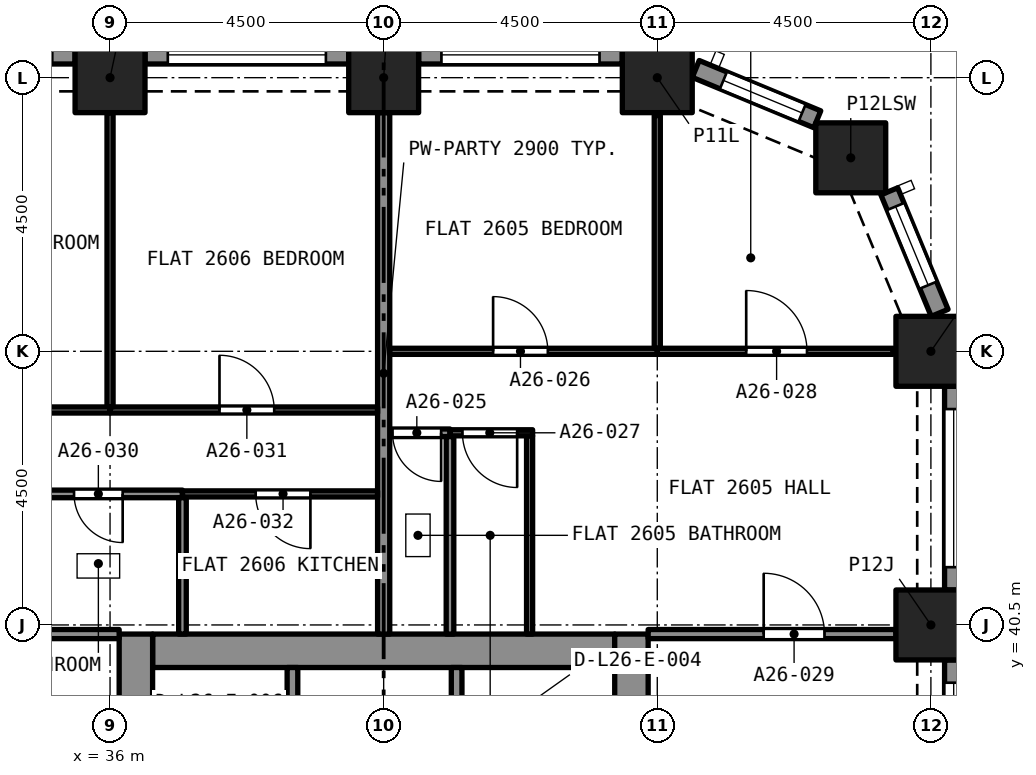
"""IFC4 building model, lengths in metres.
Left out: names, types, materials, properties, quantities, classifications, styles, units other than length and angle.
Written with IfcOpenShell. Run it as: python <this file> out.ifc"""

import sys

from ifc_helpers import new_model, si_unit, direction, frame, frame_2d, origin, origin_2d, place, context, subcontext, project, spatial, rectangle, extrude, element, fill, save


model = new_model("IFC4")
c1 = context("Model", 3, precision=1e-05, world=origin(), true_north=direction((0.0, 1.0)))
c2 = subcontext(c1, "Body", "Model", "MODEL_VIEW")
j1 = project(units=[si_unit("LENGTHUNIT", "METRE"), si_unit("PLANEANGLEUNIT", "RADIAN")], contexts=[c1])
p1 = place(None, origin())
s1 = spatial("IfcSite", under=j1, at=p1, CompositionType="ELEMENT")
p2 = place(p1, origin())
s2 = spatial("IfcBuilding", under=s1, at=p2, CompositionType="ELEMENT")
p3 = place(p2, frame((0.0, 0.0, 96.0)))
s3 = spatial("IfcBuildingStorey", under=s2, at=p3, CompositionType="ELEMENT", Elevation=96.0)
for number, where, z_axis, x_axis in (
    (1, (49.5, 40.5, 0.0), (0.0, 0.0, 1.0), (1.0, 0.0, 0.0)),
    (2, (49.5, 45.0, 0.0), (0.0, 0.0, 1.0), (1.0, 0.0, 0.0)),
    (3, (48.182, 48.182, 0.0), (0.0, 0.0, 1.0), (1.0, 0.0, 0.0)),
    (4, (36.0, 49.5, 0.0), (0.0, 0.0, 1.0), (1.0, 0.0, 0.0)),
    (5, (40.5, 49.5, 0.0), (0.0, 0.0, 1.0), (1.0, 0.0, 0.0)),
    (6, (45.0, 49.5, 0.0), (0.0, 0.0, 1.0), (1.0, 0.0, 0.0)),
):
    element("IfcColumn", number, at=place(p3, frame(where, z_axis=z_axis, x_axis=x_axis)), inside=s3, PredefinedType="COLUMN", context=c2, shape_type="SweptSolid", body=[
        extrude(rectangle(XDim=1.15, YDim=1.15, at=origin_2d()), origin(), (0.0, 0.0, 1.0), 3.2),
    ])
p4 = place(p3, frame((36.7, 40.075, 0.0), z_axis=(0.0, 0.0, 1.0), x_axis=(1.0, 0.0, 0.0)))
e7 = element("IfcWall", 7, at=p4, inside=s3, PredefinedType="SOLIDWALL", context=c2, shape_type="SweptSolid", body=[
    extrude(rectangle(XDim=7.6, YDim=0.55, at=frame_2d((3.8, 0.0))), origin(), (0.0, 0.0, 1.0), 3.2),
])
p5 = place(p3, frame((36.425, 27.15, 0.0), z_axis=(0.0, 0.0, 1.0), x_axis=(0.0, 1.0, 0.0)))
e8 = element("IfcWall", 8, at=p5, inside=s3, PredefinedType="SOLIDWALL", context=c2, shape_type="SweptSolid", body=[
    extrude(rectangle(XDim=13.2, YDim=0.55, at=frame_2d((6.6, 0.0))), origin(), (0.0, 0.0, 1.0), 3.2),
])
p6 = place(p5, frame((8.8, 0.0, 0.0)))
e9 = element("IfcOpeningElement", 9, at=p6, cuts=e8, PredefinedType="OPENING", context=c2, shape_type="SweptSolid", body=[
    extrude(rectangle(XDim=1.2, YDim=2.1, at=frame_2d((0.6, 1.05))), frame((0.0, 0.285, 0.0), z_axis=(0.0, -1.0, 0.0), x_axis=(1.0, 0.0, 0.0)), (0.0, 0.0, 1.0), 0.57),
])
p7 = place(p3, frame((44.575, 27.15, 0.0), z_axis=(0.0, 0.0, 1.0), x_axis=(0.0, 1.0, 0.0)))
e10 = element("IfcWall", 10, at=p7, inside=s3, PredefinedType="SOLIDWALL", context=c2, shape_type="SweptSolid", body=[
    extrude(rectangle(XDim=13.2, YDim=0.55, at=frame_2d((6.6, 0.0))), origin(), (0.0, 0.0, 1.0), 3.2),
])
p8 = place(p7, frame((8.8, 0.0, 0.0)))
e11 = element("IfcOpeningElement", 11, at=p8, cuts=e10, PredefinedType="OPENING", context=c2, shape_type="SweptSolid", body=[
    extrude(rectangle(XDim=1.2, YDim=2.1, at=frame_2d((0.6, 1.05))), frame((0.0, 0.285, 0.0), z_axis=(0.0, -1.0, 0.0), x_axis=(1.0, 0.0, 0.0)), (0.0, 0.0, 1.0), 0.57),
])
p9 = place(p3, frame((49.875, 39.925, 0.0), z_axis=(0.0, 0.0, 1.0), x_axis=(0.0, -1.0, 0.0)))
e12 = element("IfcWall", 12, at=p9, inside=s3, PredefinedType="SOLIDWALL", context=c2, shape_type="SweptSolid", body=[
    extrude(rectangle(XDim=3.35, YDim=0.3, at=frame_2d((1.675, 0.0))), origin(), (0.0, 0.0, 1.0), 3.2),
])
p10 = place(p9, frame((0.375, 0.0, 0.45)))
e13 = element("IfcOpeningElement", 13, at=p10, cuts=e12, PredefinedType="OPENING", context=c2, shape_type="SweptSolid", body=[
    extrude(rectangle(XDim=2.6, YDim=1.95, at=frame_2d((1.3, 0.975))), frame((0.0, 0.16, 0.0), z_axis=(0.0, -1.0, 0.0), x_axis=(1.0, 0.0, 0.0)), (0.0, 0.0, 1.0), 0.32),
])
p11 = place(p3, frame((49.875, 44.425, 0.0), z_axis=(0.0, 0.0, 1.0), x_axis=(0.0, -1.0, 0.0)))
e14 = element("IfcWall", 14, at=p11, inside=s3, PredefinedType="SOLIDWALL", context=c2, shape_type="SweptSolid", body=[
    extrude(rectangle(XDim=3.35, YDim=0.3, at=frame_2d((1.675, 0.0))), origin(), (0.0, 0.0, 1.0), 3.2),
])
p12 = place(p11, frame((0.375, 0.0, 0.45)))
e15 = element("IfcOpeningElement", 15, at=p12, cuts=e14, PredefinedType="OPENING", context=c2, shape_type="SweptSolid", body=[
    extrude(rectangle(XDim=2.6, YDim=1.95, at=frame_2d((1.3, 0.975))), frame((0.0, 0.16, 0.0), z_axis=(0.0, -1.0, 0.0), x_axis=(1.0, 0.0, 0.0)), (0.0, 0.0, 1.0), 0.32),
])
p13 = place(p3, frame((48.816, 47.631, 0.0), z_axis=(0.0, 0.0, 1.0), x_axis=(0.382723818695, -0.923862802911, 0.0)))
e16 = element("IfcWall", 16, at=p13, inside=s3, PredefinedType="SOLIDWALL", context=c2, shape_type="SweptSolid", body=[
    extrude(rectangle(XDim=2.164, YDim=0.3, at=frame_2d((1.082, 0.0))), origin(), (0.0, 0.0, 1.0), 3.2),
])
p14 = place(p13, frame((0.271, 0.0, 0.45)))
e17 = element("IfcOpeningElement", 17, at=p14, cuts=e16, PredefinedType="OPENING", context=c2, shape_type="SweptSolid", body=[
    extrude(rectangle(XDim=1.4, YDim=1.95, at=frame_2d((0.7, 0.975))), frame((0.0, 0.16, 0.0), z_axis=(0.0, -1.0, 0.0), x_axis=(1.0, 0.0, 0.0)), (0.0, 0.0, 1.0), 0.32),
])
p15 = place(p3, frame((45.632, 49.644, 0.0), z_axis=(0.0, 0.0, 1.0), x_axis=(0.923862802911, -0.382723818695, 0.0)))
e18 = element("IfcWall", 18, at=p15, inside=s3, PredefinedType="SOLIDWALL", context=c2, shape_type="SweptSolid", body=[
    extrude(rectangle(XDim=2.164, YDim=0.3, at=frame_2d((1.082, 0.0))), origin(), (0.0, 0.0, 1.0), 3.2),
])
p16 = place(p15, frame((0.493, 0.0, 0.45)))
e19 = element("IfcOpeningElement", 19, at=p16, cuts=e18, PredefinedType="OPENING", context=c2, shape_type="SweptSolid", body=[
    extrude(rectangle(XDim=1.4, YDim=1.95, at=frame_2d((0.7, 0.975))), frame((0.0, 0.16, 0.0), z_axis=(0.0, -1.0, 0.0), x_axis=(1.0, 0.0, 0.0)), (0.0, 0.0, 1.0), 0.32),
])
p17 = place(p3, frame((41.075, 49.875, 0.0), z_axis=(0.0, 0.0, 1.0), x_axis=(1.0, 0.0, 0.0)))
e20 = element("IfcWall", 20, at=p17, inside=s3, PredefinedType="SOLIDWALL", context=c2, shape_type="SweptSolid", body=[
    extrude(rectangle(XDim=3.35, YDim=0.3, at=frame_2d((1.675, 0.0))), origin(), (0.0, 0.0, 1.0), 3.2),
])
p18 = place(p17, frame((0.375, 0.0, 0.45)))
e21 = element("IfcOpeningElement", 21, at=p18, cuts=e20, PredefinedType="OPENING", context=c2, shape_type="SweptSolid", body=[
    extrude(rectangle(XDim=2.6, YDim=1.95, at=frame_2d((1.3, 0.975))), frame((0.0, 0.16, 0.0), z_axis=(0.0, -1.0, 0.0), x_axis=(1.0, 0.0, 0.0)), (0.0, 0.0, 1.0), 0.32),
])
p19 = place(p3, frame((36.575, 49.875, 0.0), z_axis=(0.0, 0.0, 1.0), x_axis=(1.0, 0.0, 0.0)))
e22 = element("IfcWall", 22, at=p19, inside=s3, PredefinedType="SOLIDWALL", context=c2, shape_type="SweptSolid", body=[
    extrude(rectangle(XDim=3.35, YDim=0.3, at=frame_2d((1.675, 0.0))), origin(), (0.0, 0.0, 1.0), 3.2),
])
p20 = place(p19, frame((0.375, 0.0, 0.45)))
e23 = element("IfcOpeningElement", 23, at=p20, cuts=e22, PredefinedType="OPENING", context=c2, shape_type="SweptSolid", body=[
    extrude(rectangle(XDim=2.6, YDim=1.95, at=frame_2d((1.3, 0.975))), frame((0.0, 0.16, 0.0), z_axis=(0.0, -1.0, 0.0), x_axis=(1.0, 0.0, 0.0)), (0.0, 0.0, 1.0), 0.32),
])
p21 = place(p3, frame((32.075, 49.875, 0.0), z_axis=(0.0, 0.0, 1.0), x_axis=(1.0, 0.0, 0.0)))
e24 = element("IfcWall", 24, at=p21, inside=s3, PredefinedType="SOLIDWALL", context=c2, shape_type="SweptSolid", body=[
    extrude(rectangle(XDim=3.35, YDim=0.3, at=frame_2d((1.675, 0.0))), origin(), (0.0, 0.0, 1.0), 3.2),
])
p22 = place(p21, frame((0.375, 0.0, 0.45)))
e25 = element("IfcOpeningElement", 25, at=p22, cuts=e24, PredefinedType="OPENING", context=c2, shape_type="SweptSolid", body=[
    extrude(rectangle(XDim=2.6, YDim=1.95, at=frame_2d((1.3, 0.975))), frame((0.0, 0.16, 0.0), z_axis=(0.0, -1.0, 0.0), x_axis=(1.0, 0.0, 0.0)), (0.0, 0.0, 1.0), 0.32),
])
p23 = place(p3, frame((41.591, 43.66, 0.0), z_axis=(0.0, 0.0, 1.0), x_axis=(-1.0, 0.0, 0.0)))
e26 = element("IfcWall", 26, at=p23, inside=s3, PredefinedType="PARTITIONING", context=c2, shape_type="SweptSolid", body=[
    extrude(rectangle(XDim=0.991, YDim=0.125, at=frame_2d((0.495, 0.0))), origin(), (0.0, 0.0, 1.0), 2.9),
])
p24 = place(p23, frame((0.146, 0.0, 0.0)))
e27 = element("IfcOpeningElement", 27, at=p24, cuts=e26, PredefinedType="OPENING", context=c2, shape_type="SweptSolid", body=[
    extrude(rectangle(XDim=0.8, YDim=2.1, at=frame_2d((0.4, 1.05))), frame((0.0, 0.073, 0.0), z_axis=(0.0, -1.0, 0.0), x_axis=(1.0, 0.0, 0.0)), (0.0, 0.0, 1.0), 0.145),
])
p25 = place(p3, frame((41.591, 40.35, 0.0), z_axis=(0.0, 0.0, 1.0), x_axis=(0.0, 1.0, 0.0)))
e28 = element("IfcWall", 28, at=p25, inside=s3, PredefinedType="PARTITIONING", context=c2, shape_type="SweptSolid", body=[
    extrude(rectangle(XDim=3.247, YDim=0.125, at=frame_2d((1.624, 0.0))), origin(), (0.0, 0.0, 1.0), 2.9),
])
p26 = place(p3, frame((40.5, 40.35, 0.0), z_axis=(0.0, 0.0, 1.0), x_axis=(0.0, 1.0, 0.0)))
e29 = element("IfcWall", 29, at=p26, inside=s3, PredefinedType="PARTITIONING", context=c2, shape_type="SweptSolid", body=[
    extrude(rectangle(XDim=8.575, YDim=0.2, at=frame_2d((4.288, 0.0))), origin(), (0.0, 0.0, 1.0), 2.9),
])
p27 = place(p3, frame((40.6, 45.0, 0.0), z_axis=(0.0, 0.0, 1.0), x_axis=(1.0, 0.0, 0.0)))
e30 = element("IfcWall", 30, at=p27, inside=s3, PredefinedType="PARTITIONING", context=c2, shape_type="SweptSolid", body=[
    extrude(rectangle(XDim=4.4, YDim=0.1, at=frame_2d((2.2, 0.0))), origin(), (0.0, 0.0, 1.0), 2.9),
])
p28 = place(p27, frame((1.7, 0.0, 0.0)))
e31 = element("IfcOpeningElement", 31, at=p28, cuts=e30, PredefinedType="OPENING", context=c2, shape_type="SweptSolid", body=[
    extrude(rectangle(XDim=0.9, YDim=2.1, at=frame_2d((0.45, 1.05))), frame((0.0, 0.06, 0.0), z_axis=(0.0, -1.0, 0.0), x_axis=(1.0, 0.0, 0.0)), (0.0, 0.0, 1.0), 0.12),
])
p29 = place(p3, frame((45.0, 45.05, 0.0), z_axis=(0.0, 0.0, 1.0), x_axis=(0.0, 1.0, 0.0)))
e32 = element("IfcWall", 32, at=p29, inside=s3, PredefinedType="PARTITIONING", context=c2, shape_type="SweptSolid", body=[
    extrude(rectangle(XDim=3.828, YDim=0.1, at=frame_2d((1.914, 0.0))), origin(), (0.0, 0.0, 1.0), 2.9),
])
p30 = place(p3, frame((42.9, 40.35, 0.0), z_axis=(0.0, 0.0, 1.0), x_axis=(0.0, 1.0, 0.0)))
e33 = element("IfcWall", 33, at=p30, inside=s3, PredefinedType="PARTITIONING", context=c2, shape_type="SweptSolid", body=[
    extrude(rectangle(XDim=3.26, YDim=0.1, at=frame_2d((1.63, 0.0))), origin(), (0.0, 0.0, 1.0), 2.9),
])
p31 = place(p3, frame((42.95, 43.66, 0.0), z_axis=(0.0, 0.0, 1.0), x_axis=(-1.0, 0.0, 0.0)))
e34 = element("IfcWall", 34, at=p31, inside=s3, PredefinedType="PARTITIONING", context=c2, shape_type="SweptSolid", body=[
    extrude(rectangle(XDim=1.359, YDim=0.1, at=frame_2d((0.68, 0.0))), origin(), (0.0, 0.0, 1.0), 2.9),
])
p32 = place(p31, frame((0.254, 0.0, 0.0)))
e35 = element("IfcOpeningElement", 35, at=p32, cuts=e34, PredefinedType="OPENING", context=c2, shape_type="SweptSolid", body=[
    extrude(rectangle(XDim=0.9, YDim=2.1, at=frame_2d((0.45, 1.05))), frame((0.0, 0.06, 0.0), z_axis=(0.0, -1.0, 0.0), x_axis=(1.0, 0.0, 0.0)), (0.0, 0.0, 1.0), 0.12),
])
p33 = place(p3, frame((45.0, 45.0, 0.0), z_axis=(0.0, 0.0, 1.0), x_axis=(1.0, 0.0, 0.0)))
e36 = element("IfcWall", 36, at=p33, inside=s3, PredefinedType="PARTITIONING", context=c2, shape_type="SweptSolid", body=[
    extrude(rectangle(XDim=3.878, YDim=0.1, at=frame_2d((1.939, 0.0))), origin(), (0.0, 0.0, 1.0), 2.9),
])
p34 = place(p33, frame((1.462, 0.0, 0.0)))
e37 = element("IfcOpeningElement", 37, at=p34, cuts=e36, PredefinedType="OPENING", context=c2, shape_type="SweptSolid", body=[
    extrude(rectangle(XDim=1.0, YDim=2.1, at=frame_2d((0.5, 1.05))), frame((0.0, 0.06, 0.0), z_axis=(0.0, -1.0, 0.0), x_axis=(1.0, 0.0, 0.0)), (0.0, 0.0, 1.0), 0.12),
])
p35 = place(p3, frame((44.85, 40.35, 0.0), z_axis=(0.0, 0.0, 1.0), x_axis=(1.0, 0.0, 0.0)))
e38 = element("IfcWall", 38, at=p35, inside=s3, PredefinedType="PARTITIONING", context=c2, shape_type="SweptSolid", body=[
    extrude(rectangle(XDim=4.075, YDim=0.15, at=frame_2d((2.038, 0.0))), origin(), (0.0, 0.0, 1.0), 2.9),
])
p36 = place(p35, frame((1.9, 0.0, 0.0)))
e39 = element("IfcOpeningElement", 39, at=p36, cuts=e38, PredefinedType="OPENING", context=c2, shape_type="SweptSolid", body=[
    extrude(rectangle(XDim=1.0, YDim=2.1, at=frame_2d((0.5, 1.05))), frame((0.0, 0.085, 0.0), z_axis=(0.0, -1.0, 0.0), x_axis=(1.0, 0.0, 0.0)), (0.0, 0.0, 1.0), 0.17),
])
p37 = place(p3, frame((37.19, 42.655, 0.0), z_axis=(0.0, 0.0, 1.0), x_axis=(-1.0, 0.0, 0.0)))
e40 = element("IfcWall", 40, at=p37, inside=s3, PredefinedType="PARTITIONING", context=c2, shape_type="SweptSolid", body=[
    extrude(rectangle(XDim=2.828, YDim=0.125, at=frame_2d((1.414, 0.0))), origin(), (0.0, 0.0, 1.0), 2.9),
])
p38 = place(p37, frame((0.983, 0.0, 0.0)))
e41 = element("IfcOpeningElement", 41, at=p38, cuts=e40, PredefinedType="OPENING", context=c2, shape_type="SweptSolid", body=[
    extrude(rectangle(XDim=0.8, YDim=2.1, at=frame_2d((0.4, 1.05))), frame((0.0, 0.073, 0.0), z_axis=(0.0, -1.0, 0.0), x_axis=(1.0, 0.0, 0.0)), (0.0, 0.0, 1.0), 0.145),
])
p39 = place(p3, frame((37.191, 40.35, 0.0), z_axis=(0.0, 0.0, 1.0), x_axis=(0.0, 1.0, 0.0)))
e42 = element("IfcWall", 42, at=p39, inside=s3, PredefinedType="PARTITIONING", context=c2, shape_type="SweptSolid", body=[
    extrude(rectangle(XDim=2.242, YDim=0.125, at=frame_2d((1.121, 0.0))), origin(), (0.0, 0.0, 1.0), 2.9),
])
p40 = place(p3, frame((34.425, 40.35, 0.0), z_axis=(0.0, 0.0, 1.0), x_axis=(1.0, 0.0, 0.0)))
e43 = element("IfcWall", 43, at=p40, inside=s3, PredefinedType="PARTITIONING", context=c2, shape_type="SweptSolid", body=[
    extrude(rectangle(XDim=1.725, YDim=0.15, at=frame_2d((0.862, 0.0))), origin(), (0.0, 0.0, 1.0), 2.9),
])
p41 = place(p3, frame((36.0, 44.035, 0.0), z_axis=(0.0, 0.0, 1.0), x_axis=(1.0, 0.0, 0.0)))
e44 = element("IfcWall", 44, at=p41, inside=s3, PredefinedType="PARTITIONING", context=c2, shape_type="SweptSolid", body=[
    extrude(rectangle(XDim=4.4, YDim=0.1, at=frame_2d((2.2, 0.0))), origin(), (0.0, 0.0, 1.0), 2.9),
])
p42 = place(p41, frame((1.8, 0.0, 0.0)))
e45 = element("IfcOpeningElement", 45, at=p42, cuts=e44, PredefinedType="OPENING", context=c2, shape_type="SweptSolid", body=[
    extrude(rectangle(XDim=0.9, YDim=2.1, at=frame_2d((0.45, 1.05))), frame((0.0, 0.06, 0.0), z_axis=(0.0, -1.0, 0.0), x_axis=(1.0, 0.0, 0.0)), (0.0, 0.0, 1.0), 0.12),
])
p43 = place(p3, frame((36.0, 44.085, 0.0), z_axis=(0.0, 0.0, 1.0), x_axis=(0.0, 1.0, 0.0)))
e46 = element("IfcWall", 46, at=p43, inside=s3, PredefinedType="PARTITIONING", context=c2, shape_type="SweptSolid", body=[
    extrude(rectangle(XDim=4.84, YDim=0.1, at=frame_2d((2.42, 0.0))), origin(), (0.0, 0.0, 1.0), 2.9),
])
p44 = place(p3, frame((40.4, 42.655, 0.0), z_axis=(0.0, 0.0, 1.0), x_axis=(-1.0, 0.0, 0.0)))
e47 = element("IfcWall", 47, at=p44, inside=s3, PredefinedType="PARTITIONING", context=c2, shape_type="SweptSolid", body=[
    extrude(rectangle(XDim=3.209, YDim=0.1, at=frame_2d((1.605, 0.0))), origin(), (0.0, 0.0, 1.0), 2.9),
])
p45 = place(p44, frame((1.105, 0.0, 0.0)))
e48 = element("IfcOpeningElement", 48, at=p45, cuts=e47, PredefinedType="OPENING", context=c2, shape_type="SweptSolid", body=[
    extrude(rectangle(XDim=0.9, YDim=2.1, at=frame_2d((0.45, 1.05))), frame((0.0, 0.06, 0.0), z_axis=(0.0, -1.0, 0.0), x_axis=(1.0, 0.0, 0.0)), (0.0, 0.0, 1.0), 0.12),
])
p46 = place(p3, frame((31.6, 44.035, 0.0), z_axis=(0.0, 0.0, 1.0), x_axis=(1.0, 0.0, 0.0)))
e49 = element("IfcWall", 49, at=p46, inside=s3, PredefinedType="PARTITIONING", context=c2, shape_type="SweptSolid", body=[
    extrude(rectangle(XDim=4.4, YDim=0.1, at=frame_2d((2.2, 0.0))), origin(), (0.0, 0.0, 1.0), 2.9),
])
p47 = place(p46, frame((1.65, 0.0, 0.0)))
e50 = element("IfcOpeningElement", 50, at=p47, cuts=e49, PredefinedType="OPENING", context=c2, shape_type="SweptSolid", body=[
    extrude(rectangle(XDim=1.0, YDim=2.1, at=frame_2d((0.5, 1.05))), frame((0.0, 0.06, 0.0), z_axis=(0.0, -1.0, 0.0), x_axis=(1.0, 0.0, 0.0)), (0.0, 0.0, 1.0), 0.12),
])
for number, where, z_axis, x_axis in (
    (51, (41.7, 37.5, 0.0), (0.0, 0.0, 1.0), (0.0, 1.0, 0.0)),
    (52, (39.0, 37.5, 0.0), (0.0, 0.0, 1.0), (0.0, 1.0, 0.0)),
):
    element("IfcWall", number, at=place(p3, frame(where, z_axis=z_axis, x_axis=x_axis)), inside=s3, PredefinedType="SOLIDWALL", context=c2, shape_type="SweptSolid", body=[
        extrude(rectangle(XDim=2.3, YDim=0.175, at=frame_2d((1.15, 0.0))), origin(), (0.0, 0.0, 1.0), 2.9),
    ])
p48 = place(p10, origin())
e53 = element("IfcWindow", 53, at=p48, inside=s3, PartitioningType="SINGLE_PANEL", PredefinedType="WINDOW", context=c2, shape_type="SweptSolid", body=[
    extrude(rectangle(XDim=2.6, YDim=1.95, at=frame_2d((1.3, 0.975))), frame((0.0, 0.03, 0.0), z_axis=(0.0, -1.0, 0.0), x_axis=(1.0, 0.0, 0.0)), (0.0, 0.0, 1.0), 0.06),
])
fill(e13, e53)
p49 = place(p12, origin())
e54 = element("IfcWindow", 54, at=p49, inside=s3, PartitioningType="SINGLE_PANEL", PredefinedType="WINDOW", context=c2, shape_type="SweptSolid", body=[
    extrude(rectangle(XDim=2.6, YDim=1.95, at=frame_2d((1.3, 0.975))), frame((0.0, 0.03, 0.0), z_axis=(0.0, -1.0, 0.0), x_axis=(1.0, 0.0, 0.0)), (0.0, 0.0, 1.0), 0.06),
])
fill(e15, e54)
p50 = place(p14, origin())
e55 = element("IfcWindow", 55, at=p50, inside=s3, PartitioningType="SINGLE_PANEL", PredefinedType="WINDOW", context=c2, shape_type="SweptSolid", body=[
    extrude(rectangle(XDim=1.4, YDim=1.95, at=frame_2d((0.7, 0.975))), frame((0.0, 0.03, 0.0), z_axis=(0.0, -1.0, 0.0), x_axis=(1.0, 0.0, 0.0)), (0.0, 0.0, 1.0), 0.06),
])
fill(e17, e55)
p51 = place(p16, origin())
e56 = element("IfcWindow", 56, at=p51, inside=s3, PartitioningType="SINGLE_PANEL", PredefinedType="WINDOW", context=c2, shape_type="SweptSolid", body=[
    extrude(rectangle(XDim=1.4, YDim=1.95, at=frame_2d((0.7, 0.975))), frame((0.0, 0.03, 0.0), z_axis=(0.0, -1.0, 0.0), x_axis=(1.0, 0.0, 0.0)), (0.0, 0.0, 1.0), 0.06),
])
fill(e19, e56)
p52 = place(p18, origin())
e57 = element("IfcWindow", 57, at=p52, inside=s3, PartitioningType="SINGLE_PANEL", PredefinedType="WINDOW", context=c2, shape_type="SweptSolid", body=[
    extrude(rectangle(XDim=2.6, YDim=1.95, at=frame_2d((1.3, 0.975))), frame((0.0, 0.03, 0.0), z_axis=(0.0, -1.0, 0.0), x_axis=(1.0, 0.0, 0.0)), (0.0, 0.0, 1.0), 0.06),
])
fill(e21, e57)
p53 = place(p20, origin())
e58 = element("IfcWindow", 58, at=p53, inside=s3, PartitioningType="SINGLE_PANEL", PredefinedType="WINDOW", context=c2, shape_type="SweptSolid", body=[
    extrude(rectangle(XDim=2.6, YDim=1.95, at=frame_2d((1.3, 0.975))), frame((0.0, 0.03, 0.0), z_axis=(0.0, -1.0, 0.0), x_axis=(1.0, 0.0, 0.0)), (0.0, 0.0, 1.0), 0.06),
])
fill(e23, e58)
p54 = place(p24, origin())
e59 = element("IfcDoor", 59, at=p54, inside=s3, OperationType="SINGLE_SWING_RIGHT", PredefinedType="DOOR", context=c2, shape_type="SweptSolid", body=[
    extrude(rectangle(XDim=0.8, YDim=2.1, at=frame_2d((0.4, 1.05))), frame((0.0, 0.025, 0.0), z_axis=(0.0, -1.0, 0.0), x_axis=(1.0, 0.0, 0.0)), (0.0, 0.0, 1.0), 0.05),
])
fill(e27, e59)
p55 = place(p28, origin())
e60 = element("IfcDoor", 60, at=p55, inside=s3, OperationType="SINGLE_SWING_LEFT", PredefinedType="DOOR", context=c2, shape_type="SweptSolid", body=[
    extrude(rectangle(XDim=0.9, YDim=2.1, at=frame_2d((0.45, 1.05))), frame((0.0, 0.025, 0.0), z_axis=(0.0, -1.0, 0.0), x_axis=(1.0, 0.0, 0.0)), (0.0, 0.0, 1.0), 0.05),
])
fill(e31, e60)
p56 = place(p32, origin())
e61 = element("IfcDoor", 61, at=p56, inside=s3, OperationType="SINGLE_SWING_RIGHT", PredefinedType="DOOR", context=c2, shape_type="SweptSolid", body=[
    extrude(rectangle(XDim=0.9, YDim=2.1, at=frame_2d((0.45, 1.05))), frame((0.0, 0.025, 0.0), z_axis=(0.0, -1.0, 0.0), x_axis=(1.0, 0.0, 0.0)), (0.0, 0.0, 1.0), 0.05),
])
fill(e35, e61)
p57 = place(p34, origin())
e62 = element("IfcDoor", 62, at=p57, inside=s3, OperationType="SINGLE_SWING_RIGHT", PredefinedType="DOOR", context=c2, shape_type="SweptSolid", body=[
    extrude(rectangle(XDim=1.0, YDim=2.1, at=frame_2d((0.5, 1.05))), frame((0.0, 0.025, 0.0), z_axis=(0.0, -1.0, 0.0), x_axis=(1.0, 0.0, 0.0)), (0.0, 0.0, 1.0), 0.05),
])
fill(e37, e62)
p58 = place(p36, origin())
e63 = element("IfcDoor", 63, at=p58, inside=s3, OperationType="SINGLE_SWING_RIGHT", PredefinedType="DOOR", context=c2, shape_type="SweptSolid", body=[
    extrude(rectangle(XDim=1.0, YDim=2.1, at=frame_2d((0.5, 1.05))), frame((0.0, 0.025, 0.0), z_axis=(0.0, -1.0, 0.0), x_axis=(1.0, 0.0, 0.0)), (0.0, 0.0, 1.0), 0.05),
])
fill(e39, e63)
p59 = place(p38, origin())
e64 = element("IfcDoor", 64, at=p59, inside=s3, OperationType="SINGLE_SWING_LEFT", PredefinedType="DOOR", context=c2, shape_type="SweptSolid", body=[
    extrude(rectangle(XDim=0.8, YDim=2.1, at=frame_2d((0.4, 1.05))), frame((0.0, 0.025, 0.0), z_axis=(0.0, -1.0, 0.0), x_axis=(1.0, 0.0, 0.0)), (0.0, 0.0, 1.0), 0.05),
])
fill(e41, e64)
p60 = place(p42, origin())
e65 = element("IfcDoor", 65, at=p60, inside=s3, OperationType="SINGLE_SWING_RIGHT", PredefinedType="DOOR", context=c2, shape_type="SweptSolid", body=[
    extrude(rectangle(XDim=0.9, YDim=2.1, at=frame_2d((0.45, 1.05))), frame((0.0, 0.025, 0.0), z_axis=(0.0, -1.0, 0.0), x_axis=(1.0, 0.0, 0.0)), (0.0, 0.0, 1.0), 0.05),
])
fill(e45, e65)
p61 = place(p45, origin())
e66 = element("IfcDoor", 66, at=p61, inside=s3, OperationType="SINGLE_SWING_LEFT", PredefinedType="DOOR", context=c2, shape_type="SweptSolid", body=[
    extrude(rectangle(XDim=0.9, YDim=2.1, at=frame_2d((0.45, 1.05))), frame((0.0, 0.025, 0.0), z_axis=(0.0, -1.0, 0.0), x_axis=(1.0, 0.0, 0.0)), (0.0, 0.0, 1.0), 0.05),
])
fill(e48, e66)
save(model, sys.argv[1])
